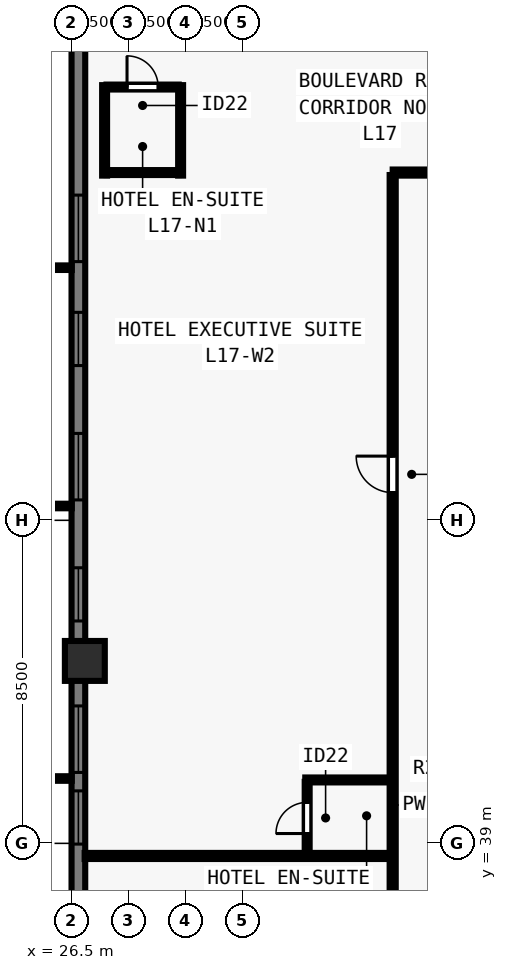
"""IFC4 building model, lengths in metres.
Left out: names, types, materials, properties, quantities, classifications, styles, units other than length and angle.
Written with IfcOpenShell. Run it as: python <this file> out.ifc"""

import sys

from ifc_helpers import new_model, si_unit, direction, frame, frame_2d, origin, origin_2d, place, context, subcontext, project, spatial, rectangle, extrude, element, fill, save


model = new_model("IFC4")
c1 = context("Model", 3, precision=1e-05, world=origin(), true_north=direction((0.0, 1.0)))
c2 = subcontext(c1, "Body", "Model", "MODEL_VIEW")
j1 = project(units=[si_unit("LENGTHUNIT", "METRE"), si_unit("PLANEANGLEUNIT", "RADIAN")], contexts=[c1])
p1 = place(None, origin())
s1 = spatial("IfcSite", under=j1, at=p1, CompositionType="ELEMENT")
p2 = place(p1, origin())
s2 = spatial("IfcBuilding", under=s1, at=p2, CompositionType="ELEMENT")
p3 = place(p2, frame((0.0, 0.0, 65.5)))
s3 = spatial("IfcBuildingStorey", under=s2, at=p3, CompositionType="ELEMENT", Elevation=65.5)
p4 = place(p3, frame((26.85, 43.8, 0.0), z_axis=(0.0, 0.0, 1.0), x_axis=(0.0, 1.0, 0.0)))
e1 = element("IfcColumn", 1, at=p4, inside=s3, PredefinedType="COLUMN", context=c2, shape_type="SweptSolid", body=[
    extrude(rectangle(XDim=1.05, YDim=1.05, at=origin_2d()), origin(), (0.0, 0.0, 1.0), 3.5),
])
p5 = place(p3, frame((26.68, 16.5, 0.0), z_axis=(0.0, 0.0, 1.0), x_axis=(0.0, 1.0, 0.0)))
e2 = element("IfcWall", 2, at=p5, inside=s3, PredefinedType="SOLIDWALL", context=c2, shape_type="SweptSolid", body=[
    extrude(rectangle(XDim=44.662, YDim=0.36, at=frame_2d((22.331, 0.0))), origin(), (0.0, 0.0, 1.0), 3.28),
])
p6 = place(p5, frame((5.505, 0.0, 0.8)))
e3 = element("IfcOpeningElement", 3, at=p6, cuts=e2, PredefinedType="OPENING", context=c2, shape_type="SweptSolid", body=[
    extrude(rectangle(XDim=1.75, YDim=1.544, at=frame_2d((0.875, 0.772))), frame((0.0, 0.19, 0.0), z_axis=(0.0, -1.0, 0.0), x_axis=(1.0, 0.0, 0.0)), (0.0, 0.0, 1.0), 0.38),
])
p7 = place(p5, frame((8.19, 0.0, 0.8)))
e4 = element("IfcOpeningElement", 4, at=p7, cuts=e2, PredefinedType="OPENING", context=c2, shape_type="SweptSolid", body=[
    extrude(rectangle(XDim=1.4, YDim=1.544, at=frame_2d((0.7, 0.772))), frame((0.0, 0.19, 0.0), z_axis=(0.0, -1.0, 0.0), x_axis=(1.0, 0.0, 0.0)), (0.0, 0.0, 1.0), 0.38),
])
p8 = place(p5, frame((11.375, 0.0, 0.8)))
e5 = element("IfcOpeningElement", 5, at=p8, cuts=e2, PredefinedType="OPENING", context=c2, shape_type="SweptSolid", body=[
    extrude(rectangle(XDim=1.75, YDim=1.544, at=frame_2d((0.875, 0.772))), frame((0.0, 0.19, 0.0), z_axis=(0.0, -1.0, 0.0), x_axis=(1.0, 0.0, 0.0)), (0.0, 0.0, 1.0), 0.38),
])
p9 = place(p5, frame((14.911, 0.0, 0.8)))
e6 = element("IfcOpeningElement", 6, at=p9, cuts=e2, PredefinedType="OPENING", context=c2, shape_type="SweptSolid", body=[
    extrude(rectangle(XDim=1.4, YDim=1.544, at=frame_2d((0.7, 0.772))), frame((0.0, 0.19, 0.0), z_axis=(0.0, -1.0, 0.0), x_axis=(1.0, 0.0, 0.0)), (0.0, 0.0, 1.0), 0.38),
])
p10 = place(p5, frame((18.546, 0.0, 0.8)))
e7 = element("IfcOpeningElement", 7, at=p10, cuts=e2, PredefinedType="OPENING", context=c2, shape_type="SweptSolid", body=[
    extrude(rectangle(XDim=1.75, YDim=1.544, at=frame_2d((0.875, 0.772))), frame((0.0, 0.19, 0.0), z_axis=(0.0, -1.0, 0.0), x_axis=(1.0, 0.0, 0.0)), (0.0, 0.0, 1.0), 0.38),
])
p11 = place(p5, frame((22.481, 0.0, 0.8)))
e8 = element("IfcOpeningElement", 8, at=p11, cuts=e2, PredefinedType="OPENING", context=c2, shape_type="SweptSolid", body=[
    extrude(rectangle(XDim=1.4, YDim=1.544, at=frame_2d((0.7, 0.772))), frame((0.0, 0.19, 0.0), z_axis=(0.0, -1.0, 0.0), x_axis=(1.0, 0.0, 0.0)), (0.0, 0.0, 1.0), 0.38),
])
p12 = place(p5, frame((24.366, 0.0, 0.8)))
e9 = element("IfcOpeningElement", 9, at=p12, cuts=e2, PredefinedType="OPENING", context=c2, shape_type="SweptSolid", body=[
    extrude(rectangle(XDim=1.75, YDim=1.544, at=frame_2d((0.875, 0.772))), frame((0.0, 0.19, 0.0), z_axis=(0.0, -1.0, 0.0), x_axis=(1.0, 0.0, 0.0)), (0.0, 0.0, 1.0), 0.38),
])
p13 = place(p5, frame((28.351, 0.0, 0.8)))
e10 = element("IfcOpeningElement", 10, at=p13, cuts=e2, PredefinedType="OPENING", context=c2, shape_type="SweptSolid", body=[
    extrude(rectangle(XDim=1.4, YDim=1.544, at=frame_2d((0.7, 0.772))), frame((0.0, 0.19, 0.0), z_axis=(0.0, -1.0, 0.0), x_axis=(1.0, 0.0, 0.0)), (0.0, 0.0, 1.0), 0.38),
])
p14 = place(p5, frame((31.537, 0.0, 0.8)))
e11 = element("IfcOpeningElement", 11, at=p14, cuts=e2, PredefinedType="OPENING", context=c2, shape_type="SweptSolid", body=[
    extrude(rectangle(XDim=1.75, YDim=1.544, at=frame_2d((0.875, 0.772))), frame((0.0, 0.19, 0.0), z_axis=(0.0, -1.0, 0.0), x_axis=(1.0, 0.0, 0.0)), (0.0, 0.0, 1.0), 0.38),
])
p15 = place(p5, frame((35.072, 0.0, 0.8)))
e12 = element("IfcOpeningElement", 12, at=p15, cuts=e2, PredefinedType="OPENING", context=c2, shape_type="SweptSolid", body=[
    extrude(rectangle(XDim=1.4, YDim=1.544, at=frame_2d((0.7, 0.772))), frame((0.0, 0.19, 0.0), z_axis=(0.0, -1.0, 0.0), x_axis=(1.0, 0.0, 0.0)), (0.0, 0.0, 1.0), 0.38),
])
p16 = place(p5, frame((37.807, 0.0, 0.8)))
e13 = element("IfcOpeningElement", 13, at=p16, cuts=e2, PredefinedType="OPENING", context=c2, shape_type="SweptSolid", body=[
    extrude(rectangle(XDim=1.75, YDim=1.544, at=frame_2d((0.875, 0.772))), frame((0.0, 0.19, 0.0), z_axis=(0.0, -1.0, 0.0), x_axis=(1.0, 0.0, 0.0)), (0.0, 0.0, 1.0), 0.38),
])
p17 = place(p3, frame((34.95, 56.65, 0.0), z_axis=(0.0, 0.0, 1.0), x_axis=(1.0, 0.0, 0.0)))
e14 = element("IfcWall", 14, at=p17, inside=s3, PredefinedType="PARTITIONING", context=c2, shape_type="SweptSolid", body=[
    extrude(rectangle(XDim=34.1, YDim=0.16, at=frame_2d((17.05, 0.0))), origin(), (0.0, 0.0, 1.0), 3.28),
])
p18 = place(p17, frame((4.166, 0.0, 0.0)))
e15 = element("IfcOpeningElement", 15, at=p18, cuts=e14, PredefinedType="OPENING", context=c2, shape_type="SweptSolid", body=[
    extrude(rectangle(XDim=0.96, YDim=2.15, at=frame_2d((0.48, 1.075))), frame((0.0, 0.09, 0.0), z_axis=(0.0, -1.0, 0.0), x_axis=(1.0, 0.0, 0.0)), (0.0, 0.0, 1.0), 0.18),
])
p19 = place(p17, frame((17.73, 0.0, 0.0)))
e16 = element("IfcOpeningElement", 16, at=p19, cuts=e14, PredefinedType="OPENING", context=c2, shape_type="SweptSolid", body=[
    extrude(rectangle(XDim=0.96, YDim=2.15, at=frame_2d((0.48, 1.075))), frame((0.0, 0.09, 0.0), z_axis=(0.0, -1.0, 0.0), x_axis=(1.0, 0.0, 0.0)), (0.0, 0.0, 1.0), 0.18),
])
p20 = place(p17, frame((30.134, 0.0, 0.0)))
e17 = element("IfcOpeningElement", 17, at=p20, cuts=e14, PredefinedType="OPENING", context=c2, shape_type="SweptSolid", body=[
    extrude(rectangle(XDim=0.96, YDim=2.15, at=frame_2d((0.48, 1.075))), frame((0.0, 0.09, 0.0), z_axis=(0.0, -1.0, 0.0), x_axis=(1.0, 0.0, 0.0)), (0.0, 0.0, 1.0), 0.18),
])
p21 = place(p3, frame((34.95, 21.415, 0.0), z_axis=(0.0, 0.0, 1.0), x_axis=(0.0, 1.0, 0.0)))
e18 = element("IfcWall", 18, at=p21, inside=s3, PredefinedType="PARTITIONING", context=c2, shape_type="SweptSolid", body=[
    extrude(rectangle(XDim=35.17, YDim=0.16, at=frame_2d((17.585, 0.0))), origin(), (0.0, 0.0, 1.0), 3.28),
])
p22 = place(p21, frame((9.414, 0.0, 0.0)))
e19 = element("IfcOpeningElement", 19, at=p22, cuts=e18, PredefinedType="OPENING", context=c2, shape_type="SweptSolid", body=[
    extrude(rectangle(XDim=0.96, YDim=2.15, at=frame_2d((0.48, 1.075))), frame((0.0, 0.09, 0.0), z_axis=(0.0, -1.0, 0.0), x_axis=(1.0, 0.0, 0.0)), (0.0, 0.0, 1.0), 0.18),
])
p23 = place(p21, frame((26.814, 0.0, 0.0)))
e20 = element("IfcOpeningElement", 20, at=p23, cuts=e18, PredefinedType="OPENING", context=c2, shape_type="SweptSolid", body=[
    extrude(rectangle(XDim=0.96, YDim=2.15, at=frame_2d((0.48, 1.075))), frame((0.0, 0.09, 0.0), z_axis=(0.0, -1.0, 0.0), x_axis=(1.0, 0.0, 0.0)), (0.0, 0.0, 1.0), 0.18),
])
for number, where, z_axis, x_axis in (
    (21, (27.37, 56.57, 0.0), (0.0, 0.0, 1.0), (0.0, 1.0, 0.0)),
    (22, (29.37, 56.57, 0.0), (0.0, 0.0, 1.0), (0.0, 1.0, 0.0)),
):
    element("IfcWall", number, at=place(p3, frame(where, z_axis=z_axis, x_axis=x_axis)), inside=s3, PredefinedType="PLUMBINGWALL", context=c2, shape_type="SweptSolid", body=[
        extrude(rectangle(XDim=2.38, YDim=0.13, at=frame_2d((1.19, 0.0))), origin(), (0.0, 0.0, 1.0), 3.28),
    ])
p24 = place(p3, frame((27.42, 58.9, 0.0), z_axis=(0.0, 0.0, 1.0), x_axis=(1.0, 0.0, 0.0)))
e23 = element("IfcWall", 23, at=p24, inside=s3, PredefinedType="PLUMBINGWALL", context=c2, shape_type="SweptSolid", body=[
    extrude(rectangle(XDim=1.9, YDim=0.13, at=frame_2d((0.95, 0.0))), origin(), (0.0, 0.0, 1.0), 3.28),
])
p25 = place(p24, frame((0.54, 0.0, 0.0)))
e24 = element("IfcOpeningElement", 24, at=p25, cuts=e23, PredefinedType="OPENING", context=c2, shape_type="SweptSolid", body=[
    extrude(rectangle(XDim=0.82, YDim=2.1, at=frame_2d((0.41, 1.05))), frame((0.0, 0.075, 0.0), z_axis=(0.0, -1.0, 0.0), x_axis=(1.0, 0.0, 0.0)), (0.0, 0.0, 1.0), 0.15),
])
p26 = place(p3, frame((27.42, 56.65, 0.0), z_axis=(0.0, 0.0, 1.0), x_axis=(1.0, 0.0, 0.0)))
e25 = element("IfcWall", 25, at=p26, inside=s3, PredefinedType="PLUMBINGWALL", context=c2, shape_type="SweptSolid", body=[
    extrude(rectangle(XDim=1.9, YDim=0.13, at=frame_2d((0.95, 0.0))), origin(), (0.0, 0.0, 1.0), 3.28),
])
p27 = place(p3, frame((26.845, 38.668, 0.0), z_axis=(0.0, 0.0, 1.0), x_axis=(1.0, 0.0, 0.0)))
e26 = element("IfcWall", 26, at=p27, inside=s3, PredefinedType="PARTITIONING", context=c2, shape_type="SweptSolid", body=[
    extrude(rectangle(XDim=8.04, YDim=0.16, at=frame_2d((4.02, 0.0))), origin(), (0.0, 0.0, 1.0), 2.849),
])
p28 = place(p3, frame((32.65, 40.668, 0.0), z_axis=(0.0, 0.0, 1.0), x_axis=(1.0, 0.0, 0.0)))
e27 = element("IfcWall", 27, at=p28, inside=s3, PredefinedType="PLUMBINGWALL", context=c2, shape_type="SweptSolid", body=[
    extrude(rectangle(XDim=2.235, YDim=0.13, at=frame_2d((1.118, 0.0))), origin(), (0.0, 0.0, 1.0), 3.28),
])
p29 = place(p3, frame((32.7, 38.733, 0.0), z_axis=(0.0, 0.0, 1.0), x_axis=(0.0, 1.0, 0.0)))
e28 = element("IfcWall", 28, at=p29, inside=s3, PredefinedType="PLUMBINGWALL", context=c2, shape_type="SweptSolid", body=[
    extrude(rectangle(XDim=1.885, YDim=0.13, at=frame_2d((0.942, 0.0))), origin(), (0.0, 0.0, 1.0), 3.28),
])
p30 = place(p29, frame((0.525, 0.0, 0.0)))
e29 = element("IfcOpeningElement", 29, at=p30, cuts=e28, PredefinedType="OPENING", context=c2, shape_type="SweptSolid", body=[
    extrude(rectangle(XDim=0.82, YDim=2.1, at=frame_2d((0.41, 1.05))), frame((0.0, 0.075, 0.0), z_axis=(0.0, -1.0, 0.0), x_axis=(1.0, 0.0, 0.0)), (0.0, 0.0, 1.0), 0.15),
])
p31 = place(p11, origin())
e30 = element("IfcWindow", 30, at=p31, inside=s3, PartitioningType="SINGLE_PANEL", PredefinedType="WINDOW", context=c2, shape_type="SweptSolid", body=[
    extrude(rectangle(XDim=1.4, YDim=1.544, at=frame_2d((0.7, 0.772))), frame((0.0, -0.05, 0.0), z_axis=(0.0, -1.0, 0.0), x_axis=(1.0, 0.0, 0.0)), (0.0, 0.0, 1.0), 0.06),
])
fill(e8, e30)
p32 = place(p12, origin())
e31 = element("IfcWindow", 31, at=p32, inside=s3, PartitioningType="SINGLE_PANEL", PredefinedType="WINDOW", context=c2, shape_type="SweptSolid", body=[
    extrude(rectangle(XDim=1.75, YDim=1.544, at=frame_2d((0.875, 0.772))), frame((0.0, -0.05, 0.0), z_axis=(0.0, -1.0, 0.0), x_axis=(1.0, 0.0, 0.0)), (0.0, 0.0, 1.0), 0.06),
])
fill(e9, e31)
p33 = place(p13, origin())
e32 = element("IfcWindow", 32, at=p33, inside=s3, PartitioningType="SINGLE_PANEL", PredefinedType="WINDOW", context=c2, shape_type="SweptSolid", body=[
    extrude(rectangle(XDim=1.4, YDim=1.544, at=frame_2d((0.7, 0.772))), frame((0.0, -0.05, 0.0), z_axis=(0.0, -1.0, 0.0), x_axis=(1.0, 0.0, 0.0)), (0.0, 0.0, 1.0), 0.06),
])
fill(e10, e32)
p34 = place(p14, origin())
e33 = element("IfcWindow", 33, at=p34, inside=s3, PartitioningType="SINGLE_PANEL", PredefinedType="WINDOW", context=c2, shape_type="SweptSolid", body=[
    extrude(rectangle(XDim=1.75, YDim=1.544, at=frame_2d((0.875, 0.772))), frame((0.0, -0.05, 0.0), z_axis=(0.0, -1.0, 0.0), x_axis=(1.0, 0.0, 0.0)), (0.0, 0.0, 1.0), 0.06),
])
fill(e11, e33)
p35 = place(p15, origin())
e34 = element("IfcWindow", 34, at=p35, inside=s3, PartitioningType="SINGLE_PANEL", PredefinedType="WINDOW", context=c2, shape_type="SweptSolid", body=[
    extrude(rectangle(XDim=1.4, YDim=1.544, at=frame_2d((0.7, 0.772))), frame((0.0, -0.05, 0.0), z_axis=(0.0, -1.0, 0.0), x_axis=(1.0, 0.0, 0.0)), (0.0, 0.0, 1.0), 0.06),
])
fill(e12, e34)
p36 = place(p16, origin())
e35 = element("IfcWindow", 35, at=p36, inside=s3, PartitioningType="SINGLE_PANEL", PredefinedType="WINDOW", context=c2, shape_type="SweptSolid", body=[
    extrude(rectangle(XDim=1.75, YDim=1.544, at=frame_2d((0.875, 0.772))), frame((0.0, -0.05, 0.0), z_axis=(0.0, -1.0, 0.0), x_axis=(1.0, 0.0, 0.0)), (0.0, 0.0, 1.0), 0.06),
])
fill(e13, e35)
p37 = place(p25, origin())
e36 = element("IfcDoor", 36, at=p37, inside=s3, OperationType="SINGLE_SWING_LEFT", PredefinedType="DOOR", context=c2, shape_type="SweptSolid", body=[
    extrude(rectangle(XDim=0.82, YDim=2.1, at=frame_2d((0.41, 1.05))), frame((0.0, 0.025, 0.0), z_axis=(0.0, -1.0, 0.0), x_axis=(1.0, 0.0, 0.0)), (0.0, 0.0, 1.0), 0.05),
])
fill(e24, e36)
p38 = place(p30, origin())
e37 = element("IfcDoor", 37, at=p38, inside=s3, OperationType="SINGLE_SWING_LEFT", PredefinedType="DOOR", context=c2, shape_type="SweptSolid", body=[
    extrude(rectangle(XDim=0.82, YDim=2.1, at=frame_2d((0.41, 1.05))), frame((0.0, 0.025, 0.0), z_axis=(0.0, -1.0, 0.0), x_axis=(1.0, 0.0, 0.0)), (0.0, 0.0, 1.0), 0.05),
])
fill(e29, e37)
p39 = place(p23, origin())
e38 = element("IfcDoor", 38, at=p39, inside=s3, OperationType="SINGLE_SWING_RIGHT", PredefinedType="DOOR", context=c2, shape_type="SweptSolid", body=[
    extrude(rectangle(XDim=0.96, YDim=2.15, at=frame_2d((0.48, 1.075))), frame((0.0, 0.025, 0.0), z_axis=(0.0, -1.0, 0.0), x_axis=(1.0, 0.0, 0.0)), (0.0, 0.0, 1.0), 0.05),
])
fill(e20, e38)
save(model, sys.argv[1])
